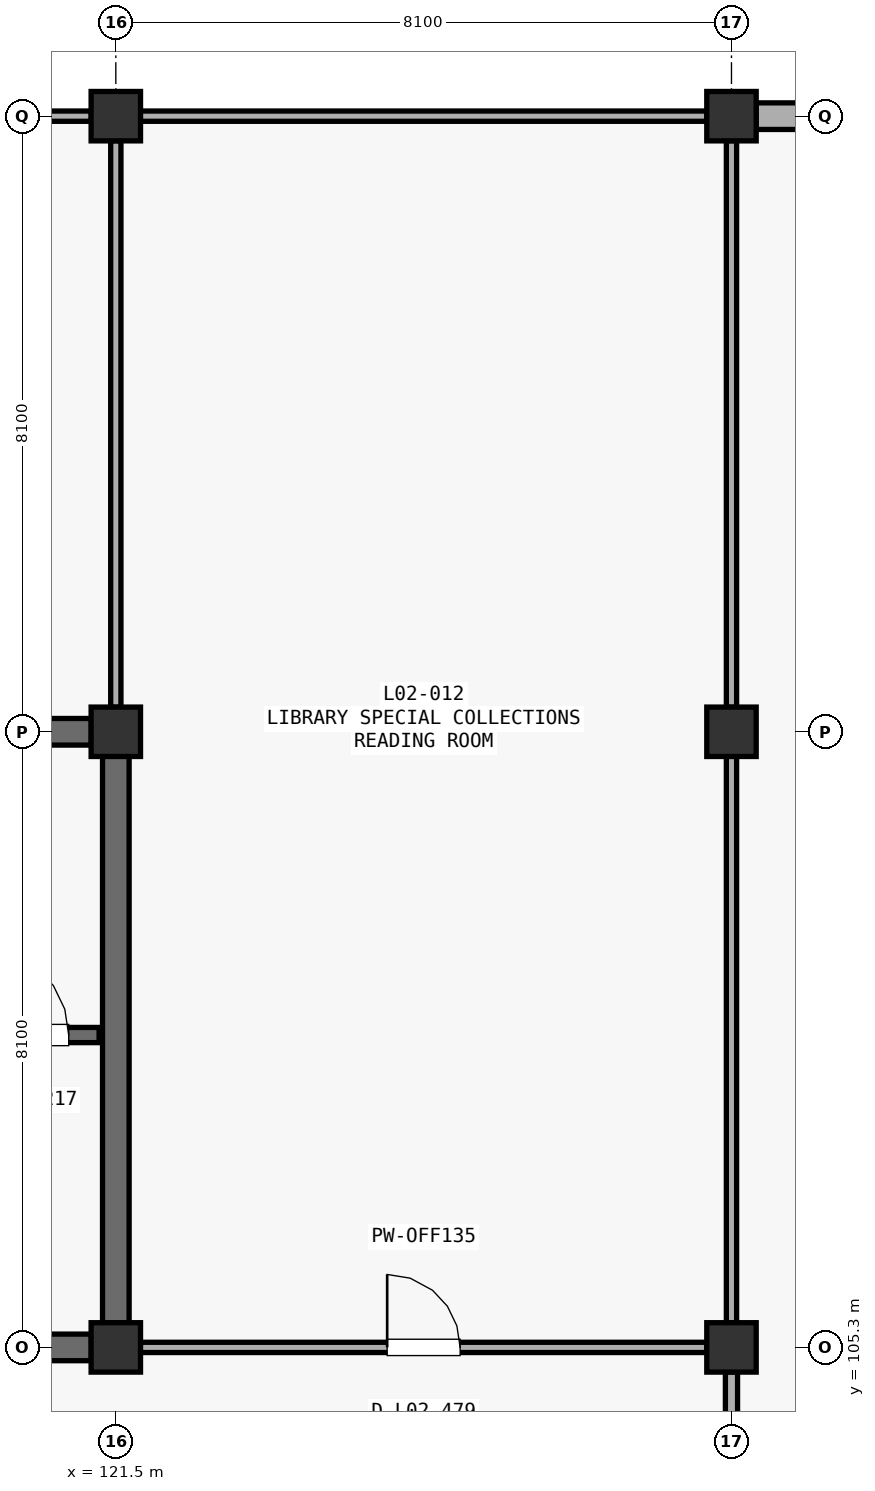
"""IFC4 building model, lengths in metres.
Left out: names, types, materials, properties, quantities, classifications, styles, units other than length and angle.
Written with IfcOpenShell. Run it as: python <this file> out.ifc"""

import sys

from ifc_helpers import new_model, si_unit, direction, frame, frame_2d, origin, origin_2d, place, context, subcontext, project, spatial, rectangle, extrude, element, fill, save


model = new_model("IFC4")
c1 = context("Model", 3, precision=1e-05, world=origin(), true_north=direction((0.0, 1.0)))
c2 = subcontext(c1, "Body", "Model", "MODEL_VIEW")
j1 = project(units=[si_unit("LENGTHUNIT", "METRE"), si_unit("PLANEANGLEUNIT", "RADIAN")], contexts=[c1])
p1 = place(None, origin())
s1 = spatial("IfcSite", under=j1, at=p1, CompositionType="ELEMENT")
p2 = place(p1, origin())
s2 = spatial("IfcBuilding", under=s1, at=p2, CompositionType="ELEMENT")
p3 = place(p2, frame((0.0, 0.0, 9.69)))
s3 = spatial("IfcBuildingStorey", under=s2, at=p3, CompositionType="ELEMENT", Elevation=9.69)
for number, where, z_axis, x_axis in (
    (1, (121.5, 105.3, 0.0), (0.0, 0.0, 1.0), (1.0, 0.0, 0.0)),
    (2, (121.5, 113.4, 0.0), (0.0, 0.0, 1.0), (1.0, 0.0, 0.0)),
    (3, (121.5, 121.5, 0.0), (0.0, 0.0, 1.0), (1.0, 0.0, 0.0)),
    (4, (129.6, 105.3, 0.0), (0.0, 0.0, 1.0), (1.0, 0.0, 0.0)),
    (5, (129.6, 113.4, 0.0), (0.0, 0.0, 1.0), (1.0, 0.0, 0.0)),
    (6, (129.6, 121.5, 0.0), (0.0, 0.0, 1.0), (1.0, 0.0, 0.0)),
):
    element("IfcColumn", number, at=place(p3, frame(where, z_axis=z_axis, x_axis=x_axis)), inside=s3, PredefinedType="COLUMN", context=c2, shape_type="SweptSolid", body=[
        extrude(rectangle(XDim=0.65, YDim=0.65, at=origin_2d()), origin(), (0.0, 0.0, 1.0), 4.42),
    ])
p4 = place(p3, frame((129.923, 121.5, 0.0), z_axis=(0.0, 0.0, 1.0), x_axis=(1.0, 0.0, 0.0)))
e7 = element("IfcWall", 7, at=p4, inside=s3, PredefinedType="STANDARD", context=c2, shape_type="SweptSolid", body=[
    extrude(rectangle(XDim=7.404, YDim=0.35, at=frame_2d((3.702, 0.0))), origin(), (0.0, 0.0, 1.0), 3.192),
])
p5 = place(p4, frame((2.152, 0.0, 0.85)))
e8 = element("IfcOpeningElement", 8, at=p5, cuts=e7, PredefinedType="OPENING", context=c2, shape_type="SweptSolid", body=[
    extrude(rectangle(XDim=3.1, YDim=1.7, at=frame_2d((1.55, 0.85))), frame((0.0, 0.185, 0.0), z_axis=(0.0, -1.0, 0.0), x_axis=(1.0, 0.0, 0.0)), (0.0, 0.0, 1.0), 0.37),
])
p6 = place(p3, frame((113.723, 113.4, 0.0), z_axis=(0.0, 0.0, 1.0), x_axis=(1.0, 0.0, 0.0)))
e9 = element("IfcWall", 9, at=p6, inside=s3, PredefinedType="SHEAR", context=c2, shape_type="SweptSolid", body=[
    extrude(rectangle(XDim=7.454, YDim=0.35, at=frame_2d((3.727, 0.0))), origin(), (0.0, 0.0, 1.0), 4.142),
])
p7 = place(p3, frame((121.5, 105.623, 0.0), z_axis=(0.0, 0.0, 1.0), x_axis=(0.0, 1.0, 0.0)))
e10 = element("IfcWall", 10, at=p7, inside=s3, PredefinedType="SHEAR", context=c2, shape_type="SweptSolid", body=[
    extrude(rectangle(XDim=7.454, YDim=0.35, at=frame_2d((3.727, 0.0))), origin(), (0.0, 0.0, 1.0), 4.142),
])
p8 = place(p3, frame((113.723, 105.3, 0.0), z_axis=(0.0, 0.0, 1.0), x_axis=(1.0, 0.0, 0.0)))
e11 = element("IfcWall", 11, at=p8, inside=s3, PredefinedType="SHEAR", context=c2, shape_type="SweptSolid", body=[
    extrude(rectangle(XDim=7.454, YDim=0.35, at=frame_2d((3.727, 0.0))), origin(), (0.0, 0.0, 1.0), 4.142),
])
p9 = place(p8, frame((5.204, 0.0, 0.0)))
e12 = element("IfcOpeningElement", 12, at=p9, cuts=e11, PredefinedType="OPENING", context=c2, shape_type="SweptSolid", body=[
    extrude(rectangle(XDim=1.2, YDim=2.2, at=frame_2d((0.6, 1.1))), frame((0.0, 0.185, 0.0), z_axis=(0.0, -1.0, 0.0), x_axis=(1.0, 0.0, 0.0)), (0.0, 0.0, 1.0), 0.37),
])
p10 = place(p3, frame((113.62, 109.41, 0.0), z_axis=(0.0, 0.0, 1.0), x_axis=(1.0, 0.0, 0.0)))
e13 = element("IfcWall", 13, at=p10, inside=s3, PredefinedType="SHEAR", context=c2, shape_type="SweptSolid", body=[
    extrude(rectangle(XDim=7.66, YDim=0.2, at=frame_2d((3.83, 0.0))), origin(), (0.0, 0.0, 1.0), 4.142),
])
p11 = place(p10, frame((6.11, 0.0, 0.0)))
e14 = element("IfcOpeningElement", 14, at=p11, cuts=e13, PredefinedType="OPENING", context=c2, shape_type="SweptSolid", body=[
    extrude(rectangle(XDim=1.15, YDim=2.2, at=frame_2d((0.575, 1.1))), frame((0.0, 0.11, 0.0), z_axis=(0.0, -1.0, 0.0), x_axis=(1.0, 0.0, 0.0)), (0.0, 0.0, 1.0), 0.22),
])
p12 = place(p3, frame((121.823, 105.3, 0.0), z_axis=(0.0, 0.0, 1.0), x_axis=(1.0, 0.0, 0.0)))
e15 = element("IfcWall", 15, at=p12, inside=s3, PredefinedType="PARTITIONING", context=c2, shape_type="SweptSolid", body=[
    extrude(rectangle(XDim=7.454, YDim=0.135, at=frame_2d((3.727, 0.0))), origin(), (0.0, 0.0, 1.0), 3.492),
])
p13 = place(p12, frame((3.247, 0.0, 0.0)))
e16 = element("IfcOpeningElement", 16, at=p13, cuts=e15, PredefinedType="OPENING", context=c2, shape_type="SweptSolid", body=[
    extrude(rectangle(XDim=0.96, YDim=2.15, at=frame_2d((0.48, 1.075))), frame((0.0, 0.078, 0.0), z_axis=(0.0, -1.0, 0.0), x_axis=(1.0, 0.0, 0.0)), (0.0, 0.0, 1.0), 0.155),
])
p14 = place(p3, frame((129.6, 105.623, 0.0), z_axis=(0.0, 0.0, 1.0), x_axis=(0.0, 1.0, 0.0)))
e17 = element("IfcWall", 17, at=p14, inside=s3, PredefinedType="PARTITIONING", context=c2, shape_type="SweptSolid", body=[
    extrude(rectangle(XDim=7.454, YDim=0.135, at=frame_2d((3.727, 0.0))), origin(), (0.0, 0.0, 1.0), 3.292),
])
p15 = place(p3, frame((129.6, 113.723, 0.0), z_axis=(0.0, 0.0, 1.0), x_axis=(0.0, 1.0, 0.0)))
e18 = element("IfcWall", 18, at=p15, inside=s3, PredefinedType="PARTITIONING", context=c2, shape_type="SweptSolid", body=[
    extrude(rectangle(XDim=7.454, YDim=0.135, at=frame_2d((3.727, 0.0))), origin(), (0.0, 0.0, 1.0), 3.192),
])
p16 = place(p3, frame((121.5, 113.723, 0.0), z_axis=(0.0, 0.0, 1.0), x_axis=(0.0, 1.0, 0.0)))
e19 = element("IfcWall", 19, at=p16, inside=s3, PredefinedType="PARTITIONING", context=c2, shape_type="SweptSolid", body=[
    extrude(rectangle(XDim=7.454, YDim=0.135, at=frame_2d((3.727, 0.0))), origin(), (0.0, 0.0, 1.0), 3.542),
])
p17 = place(p3, frame((121.823, 121.5, 0.0), z_axis=(0.0, 0.0, 1.0), x_axis=(1.0, 0.0, 0.0)))
e20 = element("IfcWall", 20, at=p17, inside=s3, PredefinedType="PARTITIONING", context=c2, shape_type="SweptSolid", body=[
    extrude(rectangle(XDim=7.454, YDim=0.135, at=frame_2d((3.727, 0.0))), origin(), (0.0, 0.0, 1.0), 3.492),
])
p18 = place(p3, frame((129.6, 97.523, 0.0), z_axis=(0.0, 0.0, 1.0), x_axis=(0.0, 1.0, 0.0)))
e21 = element("IfcWall", 21, at=p18, inside=s3, PredefinedType="PARTITIONING", context=c2, shape_type="SweptSolid", body=[
    extrude(rectangle(XDim=7.454, YDim=0.16, at=frame_2d((3.727, 0.0))), origin(), (0.0, 0.0, 1.0), 3.542),
])
p19 = place(p3, frame((113.723, 121.5, 0.0), z_axis=(0.0, 0.0, 1.0), x_axis=(1.0, 0.0, 0.0)))
e22 = element("IfcWall", 22, at=p19, inside=s3, PredefinedType="PARTITIONING", context=c2, shape_type="SweptSolid", body=[
    extrude(rectangle(XDim=7.454, YDim=0.135, at=frame_2d((3.727, 0.0))), origin(), (0.0, 0.0, 1.0), 3.542),
])
p20 = place(p11, origin())
e23 = element("IfcDoor", 23, at=p20, inside=s3, OperationType="SINGLE_SWING_LEFT", PredefinedType="DOOR", context=c2, shape_type="SweptSolid", body=[
    extrude(rectangle(XDim=1.15, YDim=2.2, at=frame_2d((0.575, 1.1))), frame((0.0, 0.025, 0.0), z_axis=(0.0, -1.0, 0.0), x_axis=(1.0, 0.0, 0.0)), (0.0, 0.0, 1.0), 0.05),
])
fill(e14, e23)
p21 = place(p13, origin())
e24 = element("IfcDoor", 24, at=p21, inside=s3, OperationType="SINGLE_SWING_LEFT", PredefinedType="DOOR", context=c2, shape_type="SweptSolid", body=[
    extrude(rectangle(XDim=0.96, YDim=2.15, at=frame_2d((0.48, 1.075))), frame((0.0, 0.025, 0.0), z_axis=(0.0, -1.0, 0.0), x_axis=(1.0, 0.0, 0.0)), (0.0, 0.0, 1.0), 0.05),
])
fill(e16, e24)
save(model, sys.argv[1])
